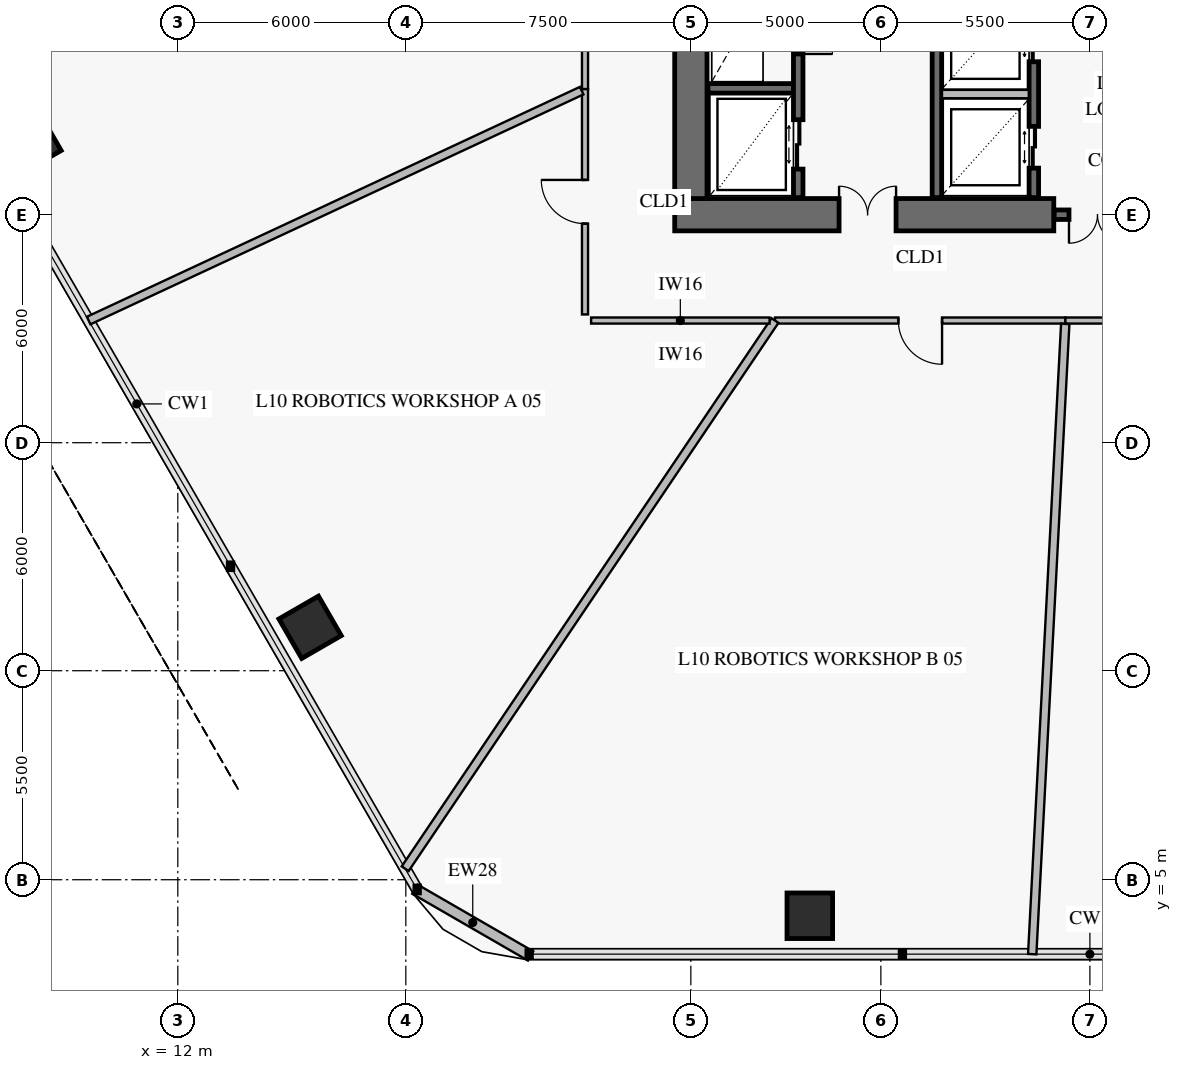
"""IFC4 building model, lengths in metres.
Left out: names, types, materials, properties, quantities, classifications, styles, units other than length and angle.
Written with IfcOpenShell. Run it as: python <this file> out.ifc"""

import sys

from ifc_helpers import new_model, si_unit, direction, frame, frame_2d, origin, origin_2d, place, context, subcontext, project, spatial, rectangle, extrude, element, fill, save


model = new_model("IFC4")
c1 = context("Model", 3, precision=1e-05, world=origin(), true_north=direction((0.0, 1.0)))
c2 = subcontext(c1, "Body", "Model", "MODEL_VIEW")
j1 = project(units=[si_unit("LENGTHUNIT", "METRE"), si_unit("PLANEANGLEUNIT", "RADIAN")], contexts=[c1])
p1 = place(None, origin())
s1 = spatial("IfcSite", under=j1, at=p1, CompositionType="ELEMENT")
p2 = place(p1, origin())
s2 = spatial("IfcBuilding", under=s1, at=p2, CompositionType="ELEMENT")
p3 = place(p2, frame((0.0, 0.0, 41.4)))
s3 = spatial("IfcBuildingStorey", under=s2, at=p3, CompositionType="ELEMENT", Elevation=41.4)
p4 = place(p3, frame((25.075, 22.5, 0.0), z_axis=(0.0, 0.0, 1.0), x_axis=(1.0, 0.0, 0.0)))
e1 = element("IfcWall", 1, at=p4, inside=s3, PredefinedType="SHEAR", context=c2, shape_type="SweptSolid", body=[
    extrude(rectangle(XDim=9.975, YDim=0.85, at=frame_2d((4.988, 0.0))), origin(), (0.0, 0.0, 1.0), 4.2),
])
p5 = place(p4, frame((4.325, 0.0, 0.0)))
e2 = element("IfcOpeningElement", 2, at=p5, cuts=e1, PredefinedType="OPENING", context=c2, shape_type="SweptSolid", body=[
    extrude(rectangle(XDim=1.5, YDim=2.15, at=frame_2d((0.75, 1.075))), frame((0.0, 0.437, 0.0), z_axis=(0.0, -1.0, 0.0), x_axis=(1.0, 0.0, 0.0)), (0.0, 0.0, 1.0), 0.874),
])
p6 = place(p3, frame((25.5, 22.925, 0.0), z_axis=(0.0, 0.0, 1.0), x_axis=(0.0, 1.0, 0.0)))
e3 = element("IfcWall", 3, at=p6, inside=s3, PredefinedType="SHEAR", context=c2, shape_type="SweptSolid", body=[
    extrude(rectangle(XDim=18.15, YDim=0.85, at=frame_2d((9.075, 0.0))), origin(), (0.0, 0.0, 1.0), 4.2),
])
p7 = place(p6, frame((8.825, 0.0, 0.0)))
e4 = element("IfcOpeningElement", 4, at=p7, cuts=e3, PredefinedType="OPENING", context=c2, shape_type="SweptSolid", body=[
    extrude(rectangle(XDim=1.1, YDim=2.15, at=frame_2d((0.55, 1.075))), frame((0.0, 0.437, 0.0), z_axis=(0.0, -1.0, 0.0), x_axis=(1.0, 0.0, 0.0)), (0.0, 0.0, 1.0), 0.874),
])
for number, where, z_axis, x_axis in (
    (5, (8.111, 24.408, 0.0), (0.0, 0.0, 1.0), (0.5, -0.866, 0.0)),
    (6, (15.481, 11.643, 0.0), (0.0, 0.0, 1.0), (0.5, -0.866, 0.0)),
    (7, (28.63, 4.052, 0.0), (0.0, 0.0, 1.0), (1.0, 0.0, 0.0)),
):
    element("IfcColumn", number, at=place(p3, frame(where, z_axis=z_axis, x_axis=x_axis)), inside=s3, PredefinedType="COLUMN", context=c2, shape_type="SweptSolid", body=[
        extrude(rectangle(XDim=1.2, YDim=1.2, at=origin_2d()), origin(), (0.0, 0.0, 1.0), 3.92),
    ])
p8 = place(p3, frame((21.283, 2.994, 0.0), z_axis=(0.0, 0.0, 1.0), x_axis=(-0.866007452331, 0.500031091541, 0.0)))
e8 = element("IfcWall", 8, at=p8, inside=s3, PredefinedType="SOLIDWALL", context=c2, shape_type="SweptSolid", body=[
    extrude(rectangle(XDim=3.515, YDim=0.28, at=frame_2d((1.757, 0.0))), origin(), (0.0, 0.0, 1.0), 3.92),
])
p9 = place(p3, frame((35.06, 22.5, 0.0), z_axis=(0.0, 0.0, 1.0), x_axis=(1.0, 0.0, 0.0)))
e9 = element("IfcWall", 9, at=p9, inside=s3, PredefinedType="SOLIDWALL", context=c2, shape_type="SweptSolid", body=[
    extrude(rectangle(XDim=2.28, YDim=0.25, at=frame_2d((1.14, 0.0))), origin(), (0.0, 0.0, 1.0), 4.2),
])
p10 = place(p9, frame((0.39, 0.0, 0.0)))
e10 = element("IfcOpeningElement", 10, at=p10, cuts=e9, PredefinedType="OPENING", context=c2, shape_type="SweptSolid", body=[
    extrude(rectangle(XDim=1.5, YDim=2.15, at=frame_2d((0.75, 1.075))), frame((0.0, 0.137, 0.0), z_axis=(0.0, -1.0, 0.0), x_axis=(1.0, 0.0, 0.0)), (0.0, 0.0, 1.0), 0.274),
])
p11 = place(p3, frame((25.95, 25.825, 0.0), z_axis=(0.0, 0.0, 1.0), x_axis=(1.0, 0.0, 0.0)))
e11 = element("IfcWall", 11, at=p11, inside=s3, PredefinedType="SOLIDWALL", context=c2, shape_type="SweptSolid", body=[
    extrude(rectangle(XDim=2.25, YDim=0.25, at=frame_2d((1.125, 0.0))), origin(), (0.0, 0.0, 1.0), 4.2),
])
p12 = place(p3, frame((28.325, 22.95, 0.0), z_axis=(0.0, 0.0, 1.0), x_axis=(0.0, 1.0, 0.0)))
e12 = element("IfcWall", 12, at=p12, inside=s3, PredefinedType="SOLIDWALL", context=c2, shape_type="SweptSolid", body=[
    extrude(rectangle(XDim=8.2, YDim=0.25, at=frame_2d((4.1, 0.0))), origin(), (0.0, 0.0, 1.0), 4.2),
])
p13 = place(p12, frame((0.75, 0.0, 0.0)))
e13 = element("IfcOpeningElement", 13, at=p13, cuts=e12, PredefinedType="OPENING", context=c2, shape_type="SweptSolid", body=[
    extrude(rectangle(XDim=1.3, YDim=2.3, at=frame_2d((0.65, 1.15))), frame((0.0, 0.137, 0.0), z_axis=(0.0, -1.0, 0.0), x_axis=(1.0, 0.0, 0.0)), (0.0, 0.0, 1.0), 0.274),
])
p14 = place(p12, frame((3.78, 0.0, 0.0)))
e14 = element("IfcOpeningElement", 14, at=p14, cuts=e12, PredefinedType="OPENING", context=c2, shape_type="SweptSolid", body=[
    extrude(rectangle(XDim=0.9, YDim=2.1, at=frame_2d((0.45, 1.05))), frame((0.0, 0.137, 0.0), z_axis=(0.0, -1.0, 0.0), x_axis=(1.0, 0.0, 0.0)), (0.0, 0.0, 1.0), 0.274),
])
p15 = place(p12, frame((6.5, 0.0, 0.0)))
e15 = element("IfcOpeningElement", 15, at=p15, cuts=e12, PredefinedType="OPENING", context=c2, shape_type="SweptSolid", body=[
    extrude(rectangle(XDim=0.9, YDim=2.1, at=frame_2d((0.45, 1.05))), frame((0.0, 0.137, 0.0), z_axis=(0.0, -1.0, 0.0), x_axis=(1.0, 0.0, 0.0)), (0.0, 0.0, 1.0), 0.274),
])
p16 = place(p3, frame((31.975, 22.95, 0.0), z_axis=(0.0, 0.0, 1.0), x_axis=(0.0, 1.0, 0.0)))
e16 = element("IfcWall", 16, at=p16, inside=s3, PredefinedType="SOLIDWALL", context=c2, shape_type="SweptSolid", body=[
    extrude(rectangle(XDim=8.2, YDim=0.25, at=frame_2d((4.1, 0.0))), origin(), (0.0, 0.0, 1.0), 4.2),
])
p17 = place(p3, frame((34.525, 22.95, 0.0), z_axis=(0.0, 0.0, 1.0), x_axis=(0.0, 1.0, 0.0)))
e17 = element("IfcWall", 17, at=p17, inside=s3, PredefinedType="SOLIDWALL", context=c2, shape_type="SweptSolid", body=[
    extrude(rectangle(XDim=8.2, YDim=0.25, at=frame_2d((4.1, 0.0))), origin(), (0.0, 0.0, 1.0), 4.2),
])
p18 = place(p17, frame((0.775, 0.0, 0.0)))
e18 = element("IfcOpeningElement", 18, at=p18, cuts=e17, PredefinedType="OPENING", context=c2, shape_type="SweptSolid", body=[
    extrude(rectangle(XDim=1.1, YDim=2.2, at=frame_2d((0.55, 1.1))), frame((0.0, 0.137, 0.0), z_axis=(0.0, -1.0, 0.0), x_axis=(1.0, 0.0, 0.0)), (0.0, 0.0, 1.0), 0.274),
])
p19 = place(p17, frame((3.575, 0.0, 0.0)))
e19 = element("IfcOpeningElement", 19, at=p19, cuts=e17, PredefinedType="OPENING", context=c2, shape_type="SweptSolid", body=[
    extrude(rectangle(XDim=1.1, YDim=2.2, at=frame_2d((0.55, 1.1))), frame((0.0, 0.137, 0.0), z_axis=(0.0, -1.0, 0.0), x_axis=(1.0, 0.0, 0.0)), (0.0, 0.0, 1.0), 0.274),
])
p20 = place(p17, frame((6.375, 0.0, 0.0)))
e20 = element("IfcOpeningElement", 20, at=p20, cuts=e17, PredefinedType="OPENING", context=c2, shape_type="SweptSolid", body=[
    extrude(rectangle(XDim=1.1, YDim=2.2, at=frame_2d((0.55, 1.1))), frame((0.0, 0.137, 0.0), z_axis=(0.0, -1.0, 0.0), x_axis=(1.0, 0.0, 0.0)), (0.0, 0.0, 1.0), 0.274),
])
p21 = place(p3, frame((22.715, 34.104, 0.0), z_axis=(0.0, 0.0, 1.0), x_axis=(0.0, -1.0, 0.0)))
e21 = element("IfcWall", 21, at=p21, inside=s3, PredefinedType="PARTITIONING", context=c2, shape_type="SweptSolid", body=[
    extrude(rectangle(XDim=8.299, YDim=0.16, at=frame_2d((4.149, 0.0))), origin(), (0.0, 0.0, 1.0), 3.22),
])
p22 = place(p21, frame((3.675, 0.0, 0.0)))
e22 = element("IfcOpeningElement", 22, at=p22, cuts=e21, PredefinedType="OPENING", context=c2, shape_type="SweptSolid", body=[
    extrude(rectangle(XDim=0.95, YDim=2.1, at=frame_2d((0.475, 1.05))), frame((0.0, 0.092, 0.0), z_axis=(0.0, -1.0, 0.0), x_axis=(1.0, 0.0, 0.0)), (0.0, 0.0, 1.0), 0.184),
])
p23 = place(p3, frame((22.715, 25.805, 0.0), z_axis=(0.0, 0.0, 1.0), x_axis=(0.0, -1.0, 0.0)))
e23 = element("IfcWall", 23, at=p23, inside=s3, PredefinedType="PARTITIONING", context=c2, shape_type="SweptSolid", body=[
    extrude(rectangle(XDim=5.93, YDim=0.16, at=frame_2d((2.965, 0.0))), origin(), (0.0, 0.0, 1.0), 3.92),
])
p24 = place(p23, frame((2.39, 0.0, 0.0)))
e24 = element("IfcOpeningElement", 24, at=p24, cuts=e23, PredefinedType="OPENING", context=c2, shape_type="SweptSolid", body=[
    extrude(rectangle(XDim=1.15, YDim=2.2, at=frame_2d((0.575, 1.1))), frame((0.0, 0.092, 0.0), z_axis=(0.0, -1.0, 0.0), x_axis=(1.0, 0.0, 0.0)), (0.0, 0.0, 1.0), 0.184),
])
p25 = place(p3, frame((27.714, 19.715, 0.0), z_axis=(0.0, 0.0, 1.0), x_axis=(1.0, 0.0, 0.0)))
e25 = element("IfcWall", 25, at=p25, inside=s3, PredefinedType="PARTITIONING", context=c2, shape_type="SweptSolid", body=[
    extrude(rectangle(XDim=7.643, YDim=0.16, at=frame_2d((3.821, 0.0))), origin(), (0.0, 0.0, 1.0), 3.22),
])
p26 = place(p25, frame((3.246, 0.0, 0.0)))
e26 = element("IfcOpeningElement", 26, at=p26, cuts=e25, PredefinedType="OPENING", context=c2, shape_type="SweptSolid", body=[
    extrude(rectangle(XDim=1.15, YDim=2.2, at=frame_2d((0.575, 1.1))), frame((0.0, 0.092, 0.0), z_axis=(0.0, -1.0, 0.0), x_axis=(1.0, 0.0, 0.0)), (0.0, 0.0, 1.0), 0.184),
])
p27 = place(p3, frame((35.356, 19.715, 0.0), z_axis=(0.0, 0.0, 1.0), x_axis=(1.0, 0.0, 0.0)))
e27 = element("IfcWall", 27, at=p27, inside=s3, PredefinedType="PARTITIONING", context=c2, shape_type="SweptSolid", body=[
    extrude(rectangle(XDim=6.372, YDim=0.16, at=frame_2d((3.186, 0.0))), origin(), (0.0, 0.0, 1.0), 3.22),
])
p28 = place(p27, frame((2.611, 0.0, 0.0)))
e28 = element("IfcOpeningElement", 28, at=p28, cuts=e27, PredefinedType="OPENING", context=c2, shape_type="SweptSolid", body=[
    extrude(rectangle(XDim=1.15, YDim=2.2, at=frame_2d((0.575, 1.1))), frame((0.0, 0.092, 0.0), z_axis=(0.0, -1.0, 0.0), x_axis=(1.0, 0.0, 0.0)), (0.0, 0.0, 1.0), 0.184),
])
p29 = place(p3, frame((32.108, 25.675, 0.0), z_axis=(0.0, 0.0, 1.0), x_axis=(1.0, 0.0, 0.0)))
e29 = element("IfcWall", 29, at=p29, inside=s3, PredefinedType="PARTITIONING", context=c2, shape_type="SweptSolid", body=[
    extrude(rectangle(XDim=2.284, YDim=0.22, at=frame_2d((1.142, 0.0))), origin(), (0.0, 0.0, 1.0), 3.92),
])
p30 = place(p3, frame((22.627, 25.764, 0.0), z_axis=(0.0, 0.0, 1.0), x_axis=(-0.906309468756, -0.422614655263, 0.0)))
e30 = element("IfcWall", 30, at=p30, inside=s3, PredefinedType="PARTITIONING", context=c2, shape_type="SweptSolid", body=[
    extrude(rectangle(XDim=14.313, YDim=0.22, at=frame_2d((7.157, 0.0))), origin(), (0.0, 0.0, 1.0), 3.17),
])
p31 = place(p3, frame((27.714, 19.715, 0.0), z_axis=(0.0, 0.0, 1.0), x_axis=(-0.559192578, -0.829037792088, 0.0)))
e31 = element("IfcWall", 31, at=p31, inside=s3, PredefinedType="PARTITIONING", context=c2, shape_type="SweptSolid", body=[
    extrude(rectangle(XDim=17.401, YDim=0.22, at=frame_2d((8.7, 0.0))), origin(), (0.0, 0.0, 1.0), 3.17),
])
p32 = place(p3, frame((22.875, 19.715, 0.0), z_axis=(0.0, 0.0, 1.0), x_axis=(1.0, 0.0, 0.0)))
e32 = element("IfcWall", 32, at=p32, inside=s3, PredefinedType="PARTITIONING", context=c2, shape_type="SweptSolid", body=[
    extrude(rectangle(XDim=4.696, YDim=0.16, at=frame_2d((2.348, 0.0))), origin(), (0.0, 0.0, 1.0), 3.22),
])
p33 = place(p3, frame((35.352, 19.627, 0.0), z_axis=(0.0, 0.0, 1.0), x_axis=(-0.052331996973, -0.998629742243, 0.0)))
e33 = element("IfcWall", 33, at=p33, inside=s3, PredefinedType="PARTITIONING", context=c2, shape_type="SweptSolid", body=[
    extrude(rectangle(XDim=16.608, YDim=0.22, at=frame_2d((8.304, 0.0))), origin(), (0.0, 0.0, 1.0), 3.17),
])
p34 = place(p5, origin())
e34 = element("IfcDoor", 34, at=p34, inside=s3, OperationType="DOUBLE_DOOR_SINGLE_SWING", PredefinedType="DOOR", context=c2, shape_type="SweptSolid", body=[
    extrude(rectangle(XDim=1.5, YDim=2.15, at=frame_2d((0.75, 1.075))), frame((0.0, 0.025, 0.0), z_axis=(0.0, -1.0, 0.0), x_axis=(1.0, 0.0, 0.0)), (0.0, 0.0, 1.0), 0.05),
])
fill(e2, e34)
p35 = place(p10, frame((1.5, 0.0, 0.0), z_axis=(0.0, 0.0, 1.0), x_axis=(-1.0, 0.0, 0.0)))
e35 = element("IfcDoor", 35, at=p35, inside=s3, OperationType="DOUBLE_DOOR_SINGLE_SWING", PredefinedType="DOOR", context=c2, shape_type="SweptSolid", body=[
    extrude(rectangle(XDim=1.5, YDim=2.15, at=frame_2d((0.75, 1.075))), frame((0.0, 0.025, 0.0), z_axis=(0.0, -1.0, 0.0), x_axis=(1.0, 0.0, 0.0)), (0.0, 0.0, 1.0), 0.05),
])
fill(e10, e35)
p36 = place(p13, frame((1.3, 0.0, 0.0), z_axis=(0.0, 0.0, 1.0), x_axis=(-1.0, 0.0, 0.0)))
e36 = element("IfcDoor", 36, at=p36, inside=s3, OperationType="DOUBLE_DOOR_SLIDING", PredefinedType="DOOR", context=c2, shape_type="SweptSolid", body=[
    extrude(rectangle(XDim=1.3, YDim=2.3, at=frame_2d((0.65, 1.15))), frame((0.0, 0.025, 0.0), z_axis=(0.0, -1.0, 0.0), x_axis=(1.0, 0.0, 0.0)), (0.0, 0.0, 1.0), 0.05),
])
fill(e13, e36)
p37 = place(p14, frame((0.9, 0.0, 0.0), z_axis=(0.0, 0.0, 1.0), x_axis=(-1.0, 0.0, 0.0)))
e37 = element("IfcDoor", 37, at=p37, inside=s3, OperationType="SINGLE_SWING_RIGHT", PredefinedType="DOOR", context=c2, shape_type="SweptSolid", body=[
    extrude(rectangle(XDim=0.9, YDim=2.1, at=frame_2d((0.45, 1.05))), frame((0.0, 0.025, 0.0), z_axis=(0.0, -1.0, 0.0), x_axis=(1.0, 0.0, 0.0)), (0.0, 0.0, 1.0), 0.05),
])
fill(e14, e37)
p38 = place(p18, frame((1.1, 0.0, 0.0), z_axis=(0.0, 0.0, 1.0), x_axis=(-1.0, 0.0, 0.0)))
e38 = element("IfcDoor", 38, at=p38, inside=s3, OperationType="DOUBLE_DOOR_SLIDING", PredefinedType="DOOR", context=c2, shape_type="SweptSolid", body=[
    extrude(rectangle(XDim=1.1, YDim=2.2, at=frame_2d((0.55, 1.1))), frame((0.0, 0.025, 0.0), z_axis=(0.0, -1.0, 0.0), x_axis=(1.0, 0.0, 0.0)), (0.0, 0.0, 1.0), 0.05),
])
fill(e18, e38)
p39 = place(p19, frame((1.1, 0.0, 0.0), z_axis=(0.0, 0.0, 1.0), x_axis=(-1.0, 0.0, 0.0)))
e39 = element("IfcDoor", 39, at=p39, inside=s3, OperationType="DOUBLE_DOOR_SLIDING", PredefinedType="DOOR", context=c2, shape_type="SweptSolid", body=[
    extrude(rectangle(XDim=1.1, YDim=2.2, at=frame_2d((0.55, 1.1))), frame((0.0, 0.025, 0.0), z_axis=(0.0, -1.0, 0.0), x_axis=(1.0, 0.0, 0.0)), (0.0, 0.0, 1.0), 0.05),
])
fill(e19, e39)
p40 = place(p24, frame((1.15, 0.0, 0.0), z_axis=(0.0, 0.0, 1.0), x_axis=(-1.0, 0.0, 0.0)))
e40 = element("IfcDoor", 40, at=p40, inside=s3, OperationType="SINGLE_SWING_RIGHT", PredefinedType="DOOR", context=c2, shape_type="SweptSolid", body=[
    extrude(rectangle(XDim=1.15, YDim=2.2, at=frame_2d((0.575, 1.1))), frame((0.0, 0.025, 0.0), z_axis=(0.0, -1.0, 0.0), x_axis=(1.0, 0.0, 0.0)), (0.0, 0.0, 1.0), 0.05),
])
fill(e24, e40)
p41 = place(p26, frame((1.15, 0.0, 0.0), z_axis=(0.0, 0.0, 1.0), x_axis=(-1.0, 0.0, 0.0)))
e41 = element("IfcDoor", 41, at=p41, inside=s3, OperationType="SINGLE_SWING_LEFT", PredefinedType="DOOR", context=c2, shape_type="SweptSolid", body=[
    extrude(rectangle(XDim=1.15, YDim=2.2, at=frame_2d((0.575, 1.1))), frame((0.0, 0.025, 0.0), z_axis=(0.0, -1.0, 0.0), x_axis=(1.0, 0.0, 0.0)), (0.0, 0.0, 1.0), 0.05),
])
fill(e26, e41)
save(model, sys.argv[1])
